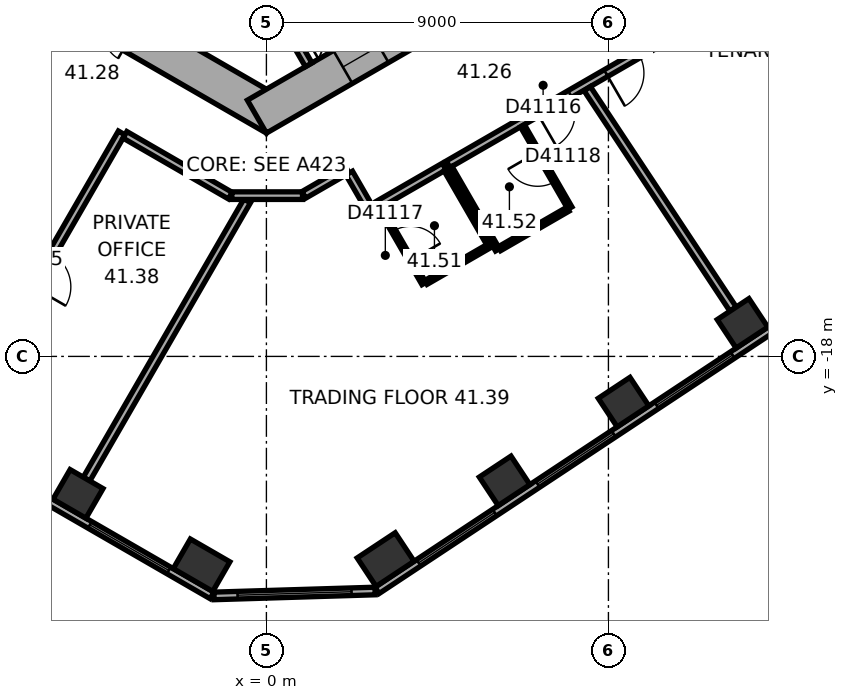
"""IFC4 building model, lengths in metres.
Left out: names, types, materials, properties, quantities, classifications, styles, units other than length and angle.
Written with IfcOpenShell. Run it as: python <this file> out.ifc"""

import sys

from ifc_helpers import new_model, si_unit, direction, frame, frame_2d, origin, origin_2d, place, context, subcontext, project, spatial, rectangle, extrude, element, fill, save


model = new_model("IFC4")
c1 = context("Model", 3, precision=1e-05, world=origin(), true_north=direction((0.0, 1.0)))
c2 = subcontext(c1, "Body", "Model", "MODEL_VIEW")
j1 = project(units=[si_unit("LENGTHUNIT", "METRE"), si_unit("PLANEANGLEUNIT", "RADIAN")], contexts=[c1])
p1 = place(None, origin())
s1 = spatial("IfcSite", under=j1, at=p1, CompositionType="ELEMENT")
p2 = place(p1, origin())
s2 = spatial("IfcBuilding", under=s1, at=p2, CompositionType="ELEMENT")
p3 = place(p2, frame((0.0, 0.0, 168.8)))
s3 = spatial("IfcBuildingStorey", under=s2, at=p3, CompositionType="ELEMENT", Elevation=168.8)
p4 = place(p3, frame((-4.958, -21.617, 0.0), z_axis=(0.0, 0.0, 1.0), x_axis=(0.866025403784, -0.5, 0.0)))
e1 = element("IfcColumn", 1, at=p4, inside=s3, PredefinedType="COLUMN", context=c2, shape_type="SweptSolid", body=[
    extrude(rectangle(XDim=1.0, YDim=0.9, at=origin_2d()), origin(), (0.0, 0.0, 1.0), 3.7),
])
for number, where, z_axis, x_axis in (
    (2, (-1.706, -23.494, 0.0), (0.0, 0.0, 1.0), (0.866, -0.5, 0.0)),
    (3, (3.137, -23.346, 0.0), (0.0, 0.0, 1.0), (0.834, 0.552, 0.0)),
):
    element("IfcColumn", number, at=place(p3, frame(where, z_axis=z_axis, x_axis=x_axis)), inside=s3, PredefinedType="COLUMN", context=c2, shape_type="SweptSolid", body=[
        extrude(rectangle(XDim=1.2, YDim=0.9, at=origin_2d()), origin(), (0.0, 0.0, 1.0), 3.7),
    ])
for number, where, z_axis, x_axis in (
    (4, (6.268, -21.274, 0.0), (0.0, 0.0, 1.0), (0.834, 0.552, 0.0)),
    (5, (9.398, -19.202, 0.0), (0.0, 0.0, 1.0), (0.834, 0.552, 0.0)),
    (6, (12.529, -17.13, 0.0), (0.0, 0.0, 1.0), (0.834, 0.552, 0.0)),
):
    element("IfcColumn", number, at=place(p3, frame(where, z_axis=z_axis, x_axis=x_axis)), inside=s3, PredefinedType="COLUMN", context=c2, shape_type="SweptSolid", body=[
        extrude(rectangle(XDim=1.0, YDim=0.9, at=origin_2d()), origin(), (0.0, 0.0, 1.0), 3.7),
    ])
p5 = place(p3, frame((-10.25, -5.629, 0.0), z_axis=(0.0, 0.0, 1.0), x_axis=(0.866022616891, -0.50000482701, 0.0)))
e7 = element("IfcWall", 7, at=p5, inside=s3, PredefinedType="SHEAR", context=c2, shape_type="SweptSolid", body=[
    extrude(rectangle(XDim=12.125, YDim=1.0, at=frame_2d((6.062, 0.0))), origin(), (0.0, 0.0, 1.0), 3.7),
])
p6 = place(p5, frame((6.262, 0.0, 0.0)))
e8 = element("IfcOpeningElement", 8, at=p6, cuts=e7, PredefinedType="OPENING", context=c2, shape_type="SweptSolid", body=[
    extrude(rectangle(XDim=1.5, YDim=2.1, at=frame_2d((0.75, 1.05))), frame((0.0, 0.51, 0.0), z_axis=(0.0, -1.0, 0.0), x_axis=(1.0, 0.0, 0.0)), (0.0, 0.0, 1.0), 1.02),
])
p7 = place(p5, frame((1.712, 0.0, 0.0)))
e9 = element("IfcOpeningElement", 9, at=p7, cuts=e7, PredefinedType="OPENING", context=c2, shape_type="SweptSolid", body=[
    extrude(rectangle(XDim=1.1, YDim=2.1, at=frame_2d((0.55, 1.05))), frame((0.0, 0.51, 0.0), z_axis=(0.0, -1.0, 0.0), x_axis=(1.0, 0.0, 0.0)), (0.0, 0.0, 1.0), 1.02),
])
p8 = place(p5, frame((4.312, 0.0, 0.0)))
e10 = element("IfcOpeningElement", 10, at=p8, cuts=e7, PredefinedType="OPENING", context=c2, shape_type="SweptSolid", body=[
    extrude(rectangle(XDim=1.1, YDim=2.1, at=frame_2d((0.55, 1.05))), frame((0.0, 0.51, 0.0), z_axis=(0.0, -1.0, 0.0), x_axis=(1.0, 0.0, 0.0)), (0.0, 0.0, 1.0), 1.02),
])
p9 = place(p3, frame((-0.25, -11.691, 0.0), z_axis=(0.0, 0.0, 1.0), x_axis=(0.866022616891, 0.50000482701, 0.0)))
e11 = element("IfcWall", 11, at=p9, inside=s3, PredefinedType="SHEAR", context=c2, shape_type="SweptSolid", body=[
    extrude(rectangle(XDim=12.125, YDim=1.0, at=frame_2d((6.062, 0.0))), origin(), (0.0, 0.0, 1.0), 3.7),
])
p10 = place(p9, frame((2.612, 0.0, 0.0)))
e12 = element("IfcOpeningElement", 12, at=p10, cuts=e11, PredefinedType="OPENING", context=c2, shape_type="SweptSolid", body=[
    extrude(rectangle(XDim=1.1, YDim=2.1, at=frame_2d((0.55, 1.05))), frame((0.0, 0.51, 0.0), z_axis=(0.0, -1.0, 0.0), x_axis=(1.0, 0.0, 0.0)), (0.0, 0.0, 1.0), 1.02),
])
p11 = place(p9, frame((5.212, 0.0, 0.0)))
e13 = element("IfcOpeningElement", 13, at=p11, cuts=e11, PredefinedType="OPENING", context=c2, shape_type="SweptSolid", body=[
    extrude(rectangle(XDim=1.1, YDim=2.1, at=frame_2d((0.55, 1.05))), frame((0.0, 0.51, 0.0), z_axis=(0.0, -1.0, 0.0), x_axis=(1.0, 0.0, 0.0)), (0.0, 0.0, 1.0), 1.02),
])
p12 = place(p9, frame((7.812, 0.0, 0.0)))
e14 = element("IfcOpeningElement", 14, at=p12, cuts=e11, PredefinedType="OPENING", context=c2, shape_type="SweptSolid", body=[
    extrude(rectangle(XDim=1.1, YDim=2.1, at=frame_2d((0.55, 1.05))), frame((0.0, 0.51, 0.0), z_axis=(0.0, -1.0, 0.0), x_axis=(1.0, 0.0, 0.0)), (0.0, 0.0, 1.0), 1.02),
])
p13 = place(p3, frame((-18.789, -14.267, 0.0), z_axis=(0.0, 0.0, 1.0), x_axis=(0.866023315909, -0.500003616288, 0.0)))
e15 = element("IfcWall", 15, at=p13, inside=s3, PredefinedType="STANDARD", context=c2, shape_type="SweptSolid", body=[
    extrude(rectangle(XDim=20.044, YDim=0.2, at=frame_2d((10.022, 0.0))), origin(), (0.0, 0.0, 1.0), 3.7),
])
p14 = place(p13, frame((1.314, 0.0, 0.9)))
e16 = element("IfcOpeningElement", 16, at=p14, cuts=e15, PredefinedType="OPENING", context=c2, shape_type="SweptSolid", body=[
    extrude(rectangle(XDim=2.4, YDim=2.0, at=frame_2d((1.2, 1.0))), frame((0.0, 0.11, 0.0), z_axis=(0.0, -1.0, 0.0), x_axis=(1.0, 0.0, 0.0)), (0.0, 0.0, 1.0), 0.22),
])
p15 = place(p13, frame((5.069, 0.0, 0.9)))
e17 = element("IfcOpeningElement", 17, at=p15, cuts=e15, PredefinedType="OPENING", context=c2, shape_type="SweptSolid", body=[
    extrude(rectangle(XDim=2.4, YDim=2.0, at=frame_2d((1.2, 1.0))), frame((0.0, 0.11, 0.0), z_axis=(0.0, -1.0, 0.0), x_axis=(1.0, 0.0, 0.0)), (0.0, 0.0, 1.0), 0.22),
])
p16 = place(p13, frame((8.823, 0.0, 0.9)))
e18 = element("IfcOpeningElement", 18, at=p16, cuts=e15, PredefinedType="OPENING", context=c2, shape_type="SweptSolid", body=[
    extrude(rectangle(XDim=2.4, YDim=2.0, at=frame_2d((1.2, 1.0))), frame((0.0, 0.11, 0.0), z_axis=(0.0, -1.0, 0.0), x_axis=(1.0, 0.0, 0.0)), (0.0, 0.0, 1.0), 0.22),
])
p17 = place(p13, frame((12.577, 0.0, 0.9)))
e19 = element("IfcOpeningElement", 19, at=p17, cuts=e15, PredefinedType="OPENING", context=c2, shape_type="SweptSolid", body=[
    extrude(rectangle(XDim=2.4, YDim=2.0, at=frame_2d((1.2, 1.0))), frame((0.0, 0.11, 0.0), z_axis=(0.0, -1.0, 0.0), x_axis=(1.0, 0.0, 0.0)), (0.0, 0.0, 1.0), 0.22),
])
p18 = place(p13, frame((16.331, 0.0, 0.9)))
e20 = element("IfcOpeningElement", 20, at=p18, cuts=e15, PredefinedType="OPENING", context=c2, shape_type="SweptSolid", body=[
    extrude(rectangle(XDim=2.4, YDim=2.0, at=frame_2d((1.2, 1.0))), frame((0.0, 0.11, 0.0), z_axis=(0.0, -1.0, 0.0), x_axis=(1.0, 0.0, 0.0)), (0.0, 0.0, 1.0), 0.22),
])
p19 = place(p3, frame((-1.378, -24.302, 0.0), z_axis=(0.0, 0.0, 1.0), x_axis=(0.999533857267, 0.030529791629, 0.0)))
e21 = element("IfcWall", 21, at=p19, inside=s3, PredefinedType="STANDARD", context=c2, shape_type="SweptSolid", body=[
    extrude(rectangle(XDim=4.238, YDim=0.2, at=frame_2d((2.119, 0.0))), origin(), (0.0, 0.0, 1.0), 3.7),
])
p20 = place(p19, frame((0.619, 0.0, 0.9)))
e22 = element("IfcOpeningElement", 22, at=p20, cuts=e21, PredefinedType="OPENING", context=c2, shape_type="SweptSolid", body=[
    extrude(rectangle(XDim=3.0, YDim=2.0, at=frame_2d((1.5, 1.0))), frame((0.0, 0.11, 0.0), z_axis=(0.0, -1.0, 0.0), x_axis=(1.0, 0.0, 0.0)), (0.0, 0.0, 1.0), 0.22),
])
p21 = place(p3, frame((2.911, -24.156, 0.0), z_axis=(0.0, 0.0, 1.0), x_axis=(0.833882163564, 0.551942512668, 0.0)))
e23 = element("IfcWall", 23, at=p21, inside=s3, PredefinedType="STANDARD", context=c2, shape_type="SweptSolid", body=[
    extrude(rectangle(XDim=20.044, YDim=0.2, at=frame_2d((10.022, 0.0))), origin(), (0.0, 0.0, 1.0), 3.7),
])
p22 = place(p21, frame((1.313, 0.0, 0.9)))
e24 = element("IfcOpeningElement", 24, at=p22, cuts=e23, PredefinedType="OPENING", context=c2, shape_type="SweptSolid", body=[
    extrude(rectangle(XDim=2.4, YDim=2.0, at=frame_2d((1.2, 1.0))), frame((0.0, 0.11, 0.0), z_axis=(0.0, -1.0, 0.0), x_axis=(1.0, 0.0, 0.0)), (0.0, 0.0, 1.0), 0.22),
])
p23 = place(p21, frame((5.067, 0.0, 0.9)))
e25 = element("IfcOpeningElement", 25, at=p23, cuts=e23, PredefinedType="OPENING", context=c2, shape_type="SweptSolid", body=[
    extrude(rectangle(XDim=2.4, YDim=2.0, at=frame_2d((1.2, 1.0))), frame((0.0, 0.11, 0.0), z_axis=(0.0, -1.0, 0.0), x_axis=(1.0, 0.0, 0.0)), (0.0, 0.0, 1.0), 0.22),
])
p24 = place(p21, frame((8.821, 0.0, 0.9)))
e26 = element("IfcOpeningElement", 26, at=p24, cuts=e23, PredefinedType="OPENING", context=c2, shape_type="SweptSolid", body=[
    extrude(rectangle(XDim=2.4, YDim=2.0, at=frame_2d((1.2, 1.0))), frame((0.0, 0.11, 0.0), z_axis=(0.0, -1.0, 0.0), x_axis=(1.0, 0.0, 0.0)), (0.0, 0.0, 1.0), 0.22),
])
p25 = place(p21, frame((12.575, 0.0, 0.9)))
e27 = element("IfcOpeningElement", 27, at=p25, cuts=e23, PredefinedType="OPENING", context=c2, shape_type="SweptSolid", body=[
    extrude(rectangle(XDim=2.4, YDim=2.0, at=frame_2d((1.2, 1.0))), frame((0.0, 0.11, 0.0), z_axis=(0.0, -1.0, 0.0), x_axis=(1.0, 0.0, 0.0)), (0.0, 0.0, 1.0), 0.22),
])
p26 = place(p21, frame((16.329, 0.0, 0.9)))
e28 = element("IfcOpeningElement", 28, at=p26, cuts=e23, PredefinedType="OPENING", context=c2, shape_type="SweptSolid", body=[
    extrude(rectangle(XDim=2.4, YDim=2.0, at=frame_2d((1.2, 1.0))), frame((0.0, 0.11, 0.0), z_axis=(0.0, -1.0, 0.0), x_axis=(1.0, 0.0, 0.0)), (0.0, 0.0, 1.0), 0.22),
])
p27 = place(p3, frame((0.013, -8.422, 0.0), z_axis=(0.0, 0.0, 1.0), x_axis=(0.500077893725, -0.86598042715, 0.0)))
e29 = element("IfcWall", 29, at=p27, inside=s3, PredefinedType="PARTITIONING", context=c2, shape_type="SweptSolid", body=[
    extrude(rectangle(XDim=2.2, YDim=0.2, at=frame_2d((1.1, 0.0))), origin(), (0.0, 0.0, 1.0), 3.42),
])
p28 = place(p3, frame((-7.984, -19.351, 0.0), z_axis=(0.0, 0.0, 1.0), x_axis=(0.500010139422, 0.866019549707, 0.0)))
e30 = element("IfcWall", 30, at=p28, inside=s3, PredefinedType="PARTITIONING", context=c2, shape_type="SweptSolid", body=[
    extrude(rectangle(XDim=8.35, YDim=0.2, at=frame_2d((4.175, 0.0))), origin(), (0.0, 0.0, 1.0), 3.42),
])
p29 = place(p28, frame((3.675, 0.0, 0.0)))
e31 = element("IfcOpeningElement", 31, at=p29, cuts=e30, PredefinedType="OPENING", context=c2, shape_type="SweptSolid", body=[
    extrude(rectangle(XDim=1.0, YDim=2.1, at=frame_2d((0.5, 1.05))), frame((0.0, 0.11, 0.0), z_axis=(0.0, -1.0, 0.0), x_axis=(1.0, 0.0, 0.0)), (0.0, 0.0, 1.0), 0.22),
])
p30 = place(p3, frame((-4.732, -21.228, 0.0), z_axis=(0.0, 0.0, 1.0), x_axis=(0.500000843414, 0.866024916838, 0.0)))
e32 = element("IfcWall", 32, at=p30, inside=s3, PredefinedType="PARTITIONING", context=c2, shape_type="SweptSolid", body=[
    extrude(rectangle(XDim=8.452, YDim=0.2, at=frame_2d((4.226, 0.0))), origin(), (0.0, 0.0, 1.0), 3.42),
])
p31 = place(p3, frame((-3.722, -12.169, 0.0), z_axis=(0.0, 0.0, 1.0), x_axis=(0.866033163891, -0.499986558861, 0.0)))
e33 = element("IfcWall", 33, at=p31, inside=s3, PredefinedType="PARTITIONING", context=c2, shape_type="SweptSolid", body=[
    extrude(rectangle(XDim=3.201, YDim=0.2, at=frame_2d((1.6, 0.0))), origin(), (0.0, 0.0, 1.0), 3.42),
])
p32 = place(p3, frame((-0.91, -13.77, 0.0), z_axis=(0.0, 0.0, 1.0), x_axis=(1.0, 0.0, 0.0)))
e34 = element("IfcWall", 34, at=p32, inside=s3, PredefinedType="PARTITIONING", context=c2, shape_type="SweptSolid", body=[
    extrude(rectangle(XDim=1.86, YDim=0.2, at=frame_2d((0.93, 0.0))), origin(), (0.0, 0.0, 1.0), 3.42),
])
p33 = place(p3, frame((0.985, -13.75, 0.0), z_axis=(0.0, 0.0, 1.0), x_axis=(0.866028661061, 0.499994358189, 0.0)))
e35 = element("IfcWall", 35, at=p33, inside=s3, PredefinedType="PARTITIONING", context=c2, shape_type="SweptSolid", body=[
    extrude(rectangle(XDim=1.321, YDim=0.2, at=frame_2d((0.661, 0.0))), origin(), (0.0, 0.0, 1.0), 3.42),
])
p34 = place(p3, frame((2.179, -13.176, 0.0), z_axis=(0.0, 0.0, 1.0), x_axis=(0.499978356969, -0.866037899034, 0.0)))
e36 = element("IfcWall", 36, at=p34, inside=s3, PredefinedType="PARTITIONING", context=c2, shape_type="SweptSolid", body=[
    extrude(rectangle(XDim=1.101, YDim=0.2, at=frame_2d((0.551, 0.0))), origin(), (0.0, 0.0, 1.0), 3.42),
])
p35 = place(p3, frame((2.946, -14.004, 0.0), z_axis=(0.0, 0.0, 1.0), x_axis=(0.866041268327, 0.499972520799, 0.0)))
e37 = element("IfcWall", 37, at=p35, inside=s3, PredefinedType="PARTITIONING", context=c2, shape_type="SweptSolid", body=[
    extrude(rectangle(XDim=2.0, YDim=0.2, at=frame_2d((1.0, 0.0))), origin(), (0.0, 0.0, 1.0), 3.42),
])
p36 = place(p3, frame((4.146, -16.083, 0.0), z_axis=(0.0, 0.0, 1.0), x_axis=(-0.499952165731, 0.866053019151, 0.0)))
e38 = element("IfcWall", 38, at=p36, inside=s3, PredefinedType="PARTITIONING", context=c2, shape_type="SweptSolid", body=[
    extrude(rectangle(XDim=2.3, YDim=0.12, at=frame_2d((1.15, 0.0))), origin(), (0.0, 0.0, 1.0), 3.42),
])
p37 = place(p36, frame((0.7, 0.0, 0.0)))
e39 = element("IfcOpeningElement", 39, at=p37, cuts=e38, PredefinedType="OPENING", context=c2, shape_type="SweptSolid", body=[
    extrude(rectangle(XDim=0.9, YDim=2.1, at=frame_2d((0.45, 1.05))), frame((0.0, 0.07, 0.0), z_axis=(0.0, -1.0, 0.0), x_axis=(1.0, 0.0, 0.0)), (0.0, 0.0, 1.0), 0.14),
])
p38 = place(p3, frame((4.728, -13.091, 0.0), z_axis=(0.0, 0.0, 1.0), x_axis=(0.500031774688, -0.866007057882, 0.0)))
e40 = element("IfcWall", 40, at=p38, inside=s3, PredefinedType="PARTITIONING", context=c2, shape_type="SweptSolid", body=[
    extrude(rectangle(XDim=2.3, YDim=0.12, at=frame_2d((1.15, 0.0))), origin(), (0.0, 0.0, 1.0), 3.42),
])
p39 = place(p3, frame((4.782, -12.944, 0.0), z_axis=(0.0, 0.0, 1.0), x_axis=(0.866022506829, 0.50000501764, 0.0)))
e41 = element("IfcWall", 41, at=p39, inside=s3, PredefinedType="PARTITIONING", context=c2, shape_type="SweptSolid", body=[
    extrude(rectangle(XDim=6.432, YDim=0.2, at=frame_2d((3.216, 0.0))), origin(), (0.0, 0.0, 1.0), 3.42),
])
p40 = place(p39, frame((2.704, 0.0, 0.0)))
e42 = element("IfcOpeningElement", 42, at=p40, cuts=e41, PredefinedType="OPENING", context=c2, shape_type="SweptSolid", body=[
    extrude(rectangle(XDim=1.0, YDim=2.1, at=frame_2d((0.5, 1.05))), frame((0.0, 0.11, 0.0), z_axis=(0.0, -1.0, 0.0), x_axis=(1.0, 0.0, 0.0)), (0.0, 0.0, 1.0), 0.22),
])
p41 = place(p39, frame((4.795, 0.0, 0.0)))
e43 = element("IfcOpeningElement", 43, at=p41, cuts=e41, PredefinedType="OPENING", context=c2, shape_type="SweptSolid", body=[
    extrude(rectangle(XDim=1.0, YDim=2.1, at=frame_2d((0.5, 1.05))), frame((0.0, 0.11, 0.0), z_axis=(0.0, -1.0, 0.0), x_axis=(1.0, 0.0, 0.0)), (0.0, 0.0, 1.0), 0.22),
])
p42 = place(p3, frame((5.826, -15.113, 0.0), z_axis=(0.0, 0.0, 1.0), x_axis=(-0.866045024864, -0.499966013754, 0.0)))
e44 = element("IfcWall", 44, at=p42, inside=s3, PredefinedType="PARTITIONING", context=c2, shape_type="SweptSolid", body=[
    extrude(rectangle(XDim=1.88, YDim=0.12, at=frame_2d((0.94, 0.0))), origin(), (0.0, 0.0, 1.0), 3.42),
])
p43 = place(p3, frame((6.082, -15.196, 0.0), z_axis=(0.0, 0.0, 1.0), x_axis=(-0.500004234368, 0.866022959057, 0.0)))
e45 = element("IfcWall", 45, at=p43, inside=s3, PredefinedType="PARTITIONING", context=c2, shape_type="SweptSolid", body=[
    extrude(rectangle(XDim=2.5, YDim=0.12, at=frame_2d((1.25, 0.0))), origin(), (0.0, 0.0, 1.0), 3.42),
])
p44 = place(p3, frame((6.737, -11.931, 0.0), z_axis=(0.0, 0.0, 1.0), x_axis=(0.500004234368, -0.866022959057, 0.0)))
e46 = element("IfcWall", 46, at=p44, inside=s3, PredefinedType="PARTITIONING", context=c2, shape_type="SweptSolid", body=[
    extrude(rectangle(XDim=2.5, YDim=0.12, at=frame_2d((1.25, 0.0))), origin(), (0.0, 0.0, 1.0), 3.42),
])
p45 = place(p44, frame((0.8, 0.0, 0.0)))
e47 = element("IfcOpeningElement", 47, at=p45, cuts=e46, PredefinedType="OPENING", context=c2, shape_type="SweptSolid", body=[
    extrude(rectangle(XDim=0.9, YDim=2.1, at=frame_2d((0.45, 1.05))), frame((0.0, 0.07, 0.0), z_axis=(0.0, -1.0, 0.0), x_axis=(1.0, 0.0, 0.0)), (0.0, 0.0, 1.0), 0.14),
])
p46 = place(p3, frame((7.935, -14.126, 0.0), z_axis=(0.0, 0.0, 1.0), x_axis=(-0.866009661879, -0.500027264788, 0.0)))
e48 = element("IfcWall", 48, at=p46, inside=s3, PredefinedType="PARTITIONING", context=c2, shape_type="SweptSolid", body=[
    extrude(rectangle(XDim=2.08, YDim=0.12, at=frame_2d((1.04, 0.0))), origin(), (0.0, 0.0, 1.0), 3.42),
])
p47 = place(p3, frame((12.281, -16.755, 0.0), z_axis=(0.0, 0.0, 1.0), x_axis=(-0.551925794663, 0.833893228888, 0.0)))
e49 = element("IfcWall", 49, at=p47, inside=s3, PredefinedType="PARTITIONING", context=c2, shape_type="SweptSolid", body=[
    extrude(rectangle(XDim=6.953, YDim=0.2, at=frame_2d((3.476, 0.0))), origin(), (0.0, 0.0, 1.0), 3.42),
])
p48 = place(p18, origin())
e50 = element("IfcWindow", 50, at=p48, inside=s3, PartitioningType="SINGLE_PANEL", PredefinedType="WINDOW", context=c2, shape_type="SweptSolid", body=[
    extrude(rectangle(XDim=2.4, YDim=2.0, at=frame_2d((1.2, 1.0))), frame((0.0, 0.03, 0.0), z_axis=(0.0, -1.0, 0.0), x_axis=(1.0, 0.0, 0.0)), (0.0, 0.0, 1.0), 0.06),
])
fill(e20, e50)
p49 = place(p20, origin())
e51 = element("IfcWindow", 51, at=p49, inside=s3, PartitioningType="SINGLE_PANEL", PredefinedType="WINDOW", context=c2, shape_type="SweptSolid", body=[
    extrude(rectangle(XDim=3.0, YDim=2.0, at=frame_2d((1.5, 1.0))), frame((0.0, 0.03, 0.0), z_axis=(0.0, -1.0, 0.0), x_axis=(1.0, 0.0, 0.0)), (0.0, 0.0, 1.0), 0.06),
])
fill(e22, e51)
p50 = place(p22, origin())
e52 = element("IfcWindow", 52, at=p50, inside=s3, PartitioningType="SINGLE_PANEL", PredefinedType="WINDOW", context=c2, shape_type="SweptSolid", body=[
    extrude(rectangle(XDim=2.4, YDim=2.0, at=frame_2d((1.2, 1.0))), frame((0.0, 0.03, 0.0), z_axis=(0.0, -1.0, 0.0), x_axis=(1.0, 0.0, 0.0)), (0.0, 0.0, 1.0), 0.06),
])
fill(e24, e52)
p51 = place(p23, origin())
e53 = element("IfcWindow", 53, at=p51, inside=s3, PartitioningType="SINGLE_PANEL", PredefinedType="WINDOW", context=c2, shape_type="SweptSolid", body=[
    extrude(rectangle(XDim=2.4, YDim=2.0, at=frame_2d((1.2, 1.0))), frame((0.0, 0.03, 0.0), z_axis=(0.0, -1.0, 0.0), x_axis=(1.0, 0.0, 0.0)), (0.0, 0.0, 1.0), 0.06),
])
fill(e25, e53)
p52 = place(p24, origin())
e54 = element("IfcWindow", 54, at=p52, inside=s3, PartitioningType="SINGLE_PANEL", PredefinedType="WINDOW", context=c2, shape_type="SweptSolid", body=[
    extrude(rectangle(XDim=2.4, YDim=2.0, at=frame_2d((1.2, 1.0))), frame((0.0, 0.03, 0.0), z_axis=(0.0, -1.0, 0.0), x_axis=(1.0, 0.0, 0.0)), (0.0, 0.0, 1.0), 0.06),
])
fill(e26, e54)
p53 = place(p10, origin())
e55 = element("IfcDoor", 55, at=p53, inside=s3, OperationType="DOUBLE_DOOR_SLIDING", PredefinedType="DOOR", context=c2, shape_type="SweptSolid", body=[
    extrude(rectangle(XDim=1.1, YDim=2.1, at=frame_2d((0.55, 1.05))), frame((0.0, 0.025, 0.0), z_axis=(0.0, -1.0, 0.0), x_axis=(1.0, 0.0, 0.0)), (0.0, 0.0, 1.0), 0.05),
])
fill(e12, e55)
p54 = place(p29, origin())
e56 = element("IfcDoor", 56, at=p54, inside=s3, OperationType="SINGLE_SWING_LEFT", PredefinedType="DOOR", context=c2, shape_type="SweptSolid", body=[
    extrude(rectangle(XDim=1.0, YDim=2.1, at=frame_2d((0.5, 1.05))), frame((0.0, 0.025, 0.0), z_axis=(0.0, -1.0, 0.0), x_axis=(1.0, 0.0, 0.0)), (0.0, 0.0, 1.0), 0.05),
])
fill(e31, e56)
p55 = place(p40, origin())
e57 = element("IfcDoor", 57, at=p55, inside=s3, OperationType="SINGLE_SWING_LEFT", PredefinedType="DOOR", context=c2, shape_type="SweptSolid", body=[
    extrude(rectangle(XDim=1.0, YDim=2.1, at=frame_2d((0.5, 1.05))), frame((0.0, 0.025, 0.0), z_axis=(0.0, -1.0, 0.0), x_axis=(1.0, 0.0, 0.0)), (0.0, 0.0, 1.0), 0.05),
])
fill(e42, e57)
p56 = place(p37, origin())
e58 = element("IfcDoor", 58, at=p56, inside=s3, OperationType="SINGLE_SWING_LEFT", PredefinedType="DOOR", context=c2, shape_type="SweptSolid", body=[
    extrude(rectangle(XDim=0.9, YDim=2.1, at=frame_2d((0.45, 1.05))), frame((0.0, 0.025, 0.0), z_axis=(0.0, -1.0, 0.0), x_axis=(1.0, 0.0, 0.0)), (0.0, 0.0, 1.0), 0.05),
])
fill(e39, e58)
p57 = place(p45, origin())
e59 = element("IfcDoor", 59, at=p57, inside=s3, OperationType="SINGLE_SWING_LEFT", PredefinedType="DOOR", context=c2, shape_type="SweptSolid", body=[
    extrude(rectangle(XDim=0.9, YDim=2.1, at=frame_2d((0.45, 1.05))), frame((0.0, 0.025, 0.0), z_axis=(0.0, -1.0, 0.0), x_axis=(1.0, 0.0, 0.0)), (0.0, 0.0, 1.0), 0.05),
])
fill(e47, e59)
p58 = place(p41, origin())
e60 = element("IfcDoor", 60, at=p58, inside=s3, OperationType="SINGLE_SWING_LEFT", PredefinedType="DOOR", context=c2, shape_type="SweptSolid", body=[
    extrude(rectangle(XDim=1.0, YDim=2.1, at=frame_2d((0.5, 1.05))), frame((0.0, 0.025, 0.0), z_axis=(0.0, -1.0, 0.0), x_axis=(1.0, 0.0, 0.0)), (0.0, 0.0, 1.0), 0.05),
])
fill(e43, e60)
save(model, sys.argv[1])
